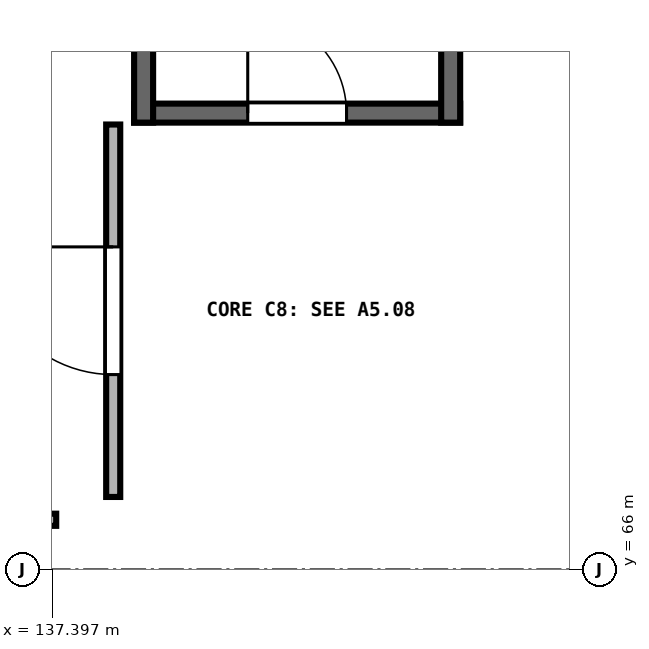
"""IFC4 building model, lengths in metres.
Left out: names, types, materials, properties, quantities, classifications, styles, units other than length and angle.
Written with IfcOpenShell. Run it as: python <this file> out.ifc"""

import sys

from ifc_helpers import new_model, si_unit, direction, frame, frame_2d, origin, place, context, subcontext, project, spatial, rectangle, extrude, element, fill, save


model = new_model("IFC4")
c1 = context("Model", 3, precision=1e-05, world=origin(), true_north=direction((0.0, 1.0)))
c2 = subcontext(c1, "Body", "Model", "MODEL_VIEW")
j1 = project(units=[si_unit("LENGTHUNIT", "METRE"), si_unit("PLANEANGLEUNIT", "RADIAN")], contexts=[c1])
p1 = place(None, origin())
s1 = spatial("IfcSite", under=j1, at=p1, CompositionType="ELEMENT")
p2 = place(p1, origin())
s2 = spatial("IfcBuilding", under=s1, at=p2, CompositionType="ELEMENT")
p3 = place(p2, frame((0.0, 0.0, 10.2)))
s3 = spatial("IfcBuildingStorey", under=s2, at=p3, CompositionType="ELEMENT", Elevation=10.2)
p4 = place(p3, frame((138.475, 72.0, 0.0), z_axis=(0.0, 0.0, 1.0), x_axis=(1.0, 0.0, 0.0)))
e1 = element("IfcWall", 1, at=p4, inside=s3, PredefinedType="SHEAR", context=c2, shape_type="SweptSolid", body=[
    extrude(rectangle(XDim=4.29, YDim=0.25, at=frame_2d((2.145, 0.0))), origin(), (0.0, 0.0, 1.0), 4.24),
])
p5 = place(p4, frame((1.495, 0.0, 0.0)))
e2 = element("IfcOpeningElement", 2, at=p5, cuts=e1, PredefinedType="OPENING", context=c2, shape_type="SweptSolid", body=[
    extrude(rectangle(XDim=1.3, YDim=2.18, at=frame_2d((0.65, 1.09))), frame((0.0, 0.135, 0.0), z_axis=(0.0, -1.0, 0.0), x_axis=(1.0, 0.0, 0.0)), (0.0, 0.0, 1.0), 0.27),
])
for number, where, z_axis, x_axis in (
    (3, (138.6, 71.875, 0.0), (0.0, 0.0, 1.0), (0.0, 1.0, 0.0)),
    (4, (142.64, 71.875, 0.0), (0.0, 0.0, 1.0), (0.0, 1.0, 0.0)),
):
    element("IfcWall", number, at=place(p3, frame(where, z_axis=z_axis, x_axis=x_axis)), inside=s3, PredefinedType="SHEAR", context=c2, shape_type="SweptSolid", body=[
        extrude(rectangle(XDim=11.09, YDim=0.25, at=frame_2d((5.545, 0.0))), origin(), (0.0, 0.0, 1.0), 4.24),
    ])
p6 = place(p3, frame((138.2, 66.95, 0.0), z_axis=(0.0, 0.0, 1.0), x_axis=(0.0, 1.0, 0.0)))
e5 = element("IfcWall", 5, at=p6, inside=s3, PredefinedType="PARTITIONING", context=c2, shape_type="SweptSolid", body=[
    extrude(rectangle(XDim=4.9, YDim=0.185, at=frame_2d((2.45, 0.0))), origin(), (0.0, 0.0, 1.0), 4.19),
])
p7 = place(p6, frame((1.61, 0.0, 0.0)))
e6 = element("IfcOpeningElement", 6, at=p7, cuts=e5, PredefinedType="OPENING", context=c2, shape_type="SweptSolid", body=[
    extrude(rectangle(XDim=1.68, YDim=2.25, at=frame_2d((0.84, 1.125))), frame((0.0, 0.103, 0.0), z_axis=(0.0, -1.0, 0.0), x_axis=(1.0, 0.0, 0.0)), (0.0, 0.0, 1.0), 0.205),
])
p8 = place(p3, frame((118.95, 66.65, 0.0), z_axis=(0.0, 0.0, 1.0), x_axis=(1.0, 0.0, 0.0)))
e7 = element("IfcWall", 7, at=p8, inside=s3, PredefinedType="PARTITIONING", context=c2, shape_type="SweptSolid", body=[
    extrude(rectangle(XDim=18.5, YDim=0.16, at=frame_2d((9.25, 0.0))), origin(), (0.0, 0.0, 1.0), 4.19),
])
p9 = place(p8, frame((11.485, 0.0, 0.0)))
e8 = element("IfcOpeningElement", 8, at=p9, cuts=e7, PredefinedType="OPENING", context=c2, shape_type="SweptSolid", body=[
    extrude(rectangle(XDim=1.08, YDim=2.18, at=frame_2d((0.54, 1.09))), frame((0.0, 0.09, 0.0), z_axis=(0.0, -1.0, 0.0), x_axis=(1.0, 0.0, 0.0)), (0.0, 0.0, 1.0), 0.18),
])
p10 = place(p5, origin())
e9 = element("IfcDoor", 9, at=p10, inside=s3, OperationType="SINGLE_SWING_LEFT", PredefinedType="DOOR", context=c2, shape_type="SweptSolid", body=[
    extrude(rectangle(XDim=1.3, YDim=2.18, at=frame_2d((0.65, 1.09))), frame((0.0, 0.025, 0.0), z_axis=(0.0, -1.0, 0.0), x_axis=(1.0, 0.0, 0.0)), (0.0, 0.0, 1.0), 0.05),
])
fill(e2, e9)
p11 = place(p7, origin())
e10 = element("IfcDoor", 10, at=p11, inside=s3, OperationType="SINGLE_SWING_RIGHT", PredefinedType="DOOR", context=c2, shape_type="SweptSolid", body=[
    extrude(rectangle(XDim=1.68, YDim=2.25, at=frame_2d((0.84, 1.125))), frame((0.0, 0.025, 0.0), z_axis=(0.0, -1.0, 0.0), x_axis=(1.0, 0.0, 0.0)), (0.0, 0.0, 1.0), 0.05),
])
fill(e6, e10)
save(model, sys.argv[1])
